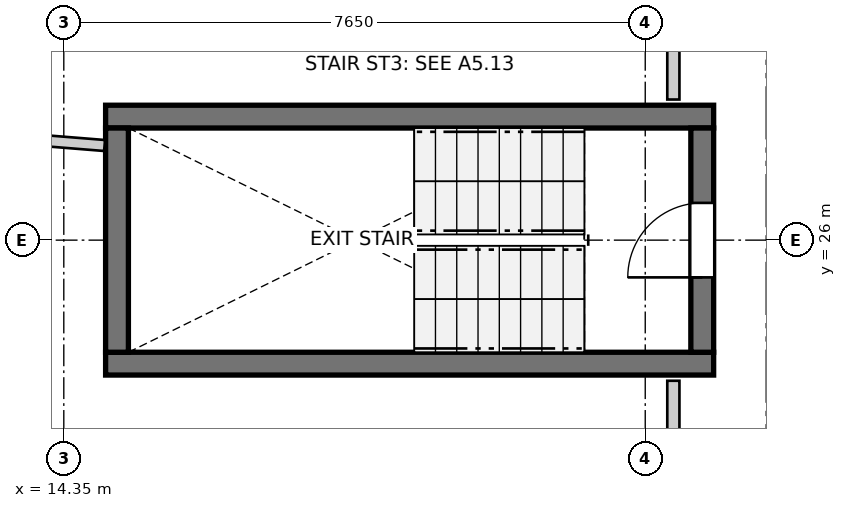
"""IFC4 building model, lengths in metres.
Left out: names, types, materials, properties, quantities, classifications, styles, units other than length and angle.
Written with IfcOpenShell. Run it as: python <this file> out.ifc"""

import sys

from ifc_helpers import new_model, si_unit, direction, frame, frame_2d, origin, place, context, subcontext, project, spatial, rectangle, extrude, source, transform, mapped, element, fill, save


model = new_model("IFC4")
c1 = context("Model", 3, precision=1e-05, world=origin(), true_north=direction((0.0, 1.0)))
c2 = subcontext(c1, "Body", "Model", "MODEL_VIEW")
j1 = project(units=[si_unit("LENGTHUNIT", "METRE"), si_unit("PLANEANGLEUNIT", "RADIAN")], contexts=[c1])
p1 = place(None, origin())
s1 = spatial("IfcSite", under=j1, at=p1, CompositionType="ELEMENT")
p2 = place(p1, origin())
s2 = spatial("IfcBuilding", under=s1, at=p2, CompositionType="ELEMENT")
p3 = place(p2, frame((0.0, 0.0, 165.0)))
s3 = spatial("IfcBuildingStorey", under=s2, at=p3, CompositionType="ELEMENT", Elevation=165.0)
for number, where, z_axis, x_axis in (
    (1, (14.9, 24.375, 0.0), (0.0, 0.0, 1.0), (1.0, 0.0, 0.0)),
    (2, (22.9, 27.625, 0.0), (0.0, 0.0, 1.0), (-1.0, 0.0, 0.0)),
):
    element("IfcWall", number, at=place(p3, frame(where, z_axis=z_axis, x_axis=x_axis)), inside=s3, PredefinedType="SHEAR", context=c2, shape_type="SweptSolid", body=[
        extrude(rectangle(XDim=8.0, YDim=0.3, at=frame_2d((4.0, 0.0))), origin(), (0.0, 0.0, 1.0), 2.95),
    ])
p4 = place(p3, frame((15.05, 27.475, 0.0), z_axis=(0.0, 0.0, 1.0), x_axis=(0.0, -1.0, 0.0)))
e3 = element("IfcWall", 3, at=p4, inside=s3, PredefinedType="SHEAR", context=c2, shape_type="SweptSolid", body=[
    extrude(rectangle(XDim=2.95, YDim=0.3, at=frame_2d((1.475, 0.0))), origin(), (0.0, 0.0, 1.0), 2.95),
])
p5 = place(p3, frame((22.75, 24.525, 0.0), z_axis=(0.0, 0.0, 1.0), x_axis=(0.0, 1.0, 0.0)))
e4 = element("IfcWall", 4, at=p5, inside=s3, PredefinedType="SHEAR", context=c2, shape_type="SweptSolid", body=[
    extrude(rectangle(XDim=2.95, YDim=0.3, at=frame_2d((1.475, 0.0))), origin(), (0.0, 0.0, 1.0), 2.95),
])
p6 = place(p5, frame((0.985, 0.0, 0.0)))
e5 = element("IfcOpeningElement", 5, at=p6, cuts=e4, PredefinedType="OPENING", context=c2, shape_type="SweptSolid", body=[
    extrude(rectangle(XDim=0.98, YDim=2.15, at=frame_2d((0.49, 1.075))), frame((0.0, 0.16, 0.0), z_axis=(0.0, -1.0, 0.0), x_axis=(1.0, 0.0, 0.0)), (0.0, 0.0, 1.0), 0.32),
])
p7 = place(p3, frame((22.37, 14.579, 0.0), z_axis=(0.0, 0.0, 1.0), x_axis=(0.0, 1.0, 0.0)))
e6 = element("IfcWall", 6, at=p7, inside=s3, PredefinedType="PARTITIONING", context=c2, shape_type="SweptSolid", body=[
    extrude(rectangle(XDim=9.571, YDim=0.16, at=frame_2d((4.785, 0.0))), origin(), (0.0, 0.0, 1.0), 2.95),
])
p8 = place(p7, frame((3.793, 0.0, 0.0)))
e7 = element("IfcOpeningElement", 7, at=p8, cuts=e6, PredefinedType="OPENING", context=c2, shape_type="SweptSolid", body=[
    extrude(rectangle(XDim=0.96, YDim=2.1, at=frame_2d((0.48, 1.05))), frame((0.0, 0.09, 0.0), z_axis=(0.0, -1.0, 0.0), x_axis=(1.0, 0.0, 0.0)), (0.0, 0.0, 1.0), 0.18),
])
p9 = place(p3, frame((22.37, 27.85, 0.0), z_axis=(0.0, 0.0, 1.0), x_axis=(0.0, 1.0, 0.0)))
e8 = element("IfcWall", 8, at=p9, inside=s3, PredefinedType="PARTITIONING", context=c2, shape_type="SweptSolid", body=[
    extrude(rectangle(XDim=4.759, YDim=0.16, at=frame_2d((2.379, 0.0))), origin(), (0.0, 0.0, 1.0), 2.95),
])
p10 = place(p9, frame((1.919, 0.0, 0.0)))
e9 = element("IfcOpeningElement", 9, at=p10, cuts=e8, PredefinedType="OPENING", context=c2, shape_type="SweptSolid", body=[
    extrude(rectangle(XDim=0.96, YDim=2.1, at=frame_2d((0.48, 1.05))), frame((0.0, 0.09, 0.0), z_axis=(0.0, -1.0, 0.0), x_axis=(1.0, 0.0, 0.0)), (0.0, 0.0, 1.0), 0.18),
])
p11 = place(p3, frame((8.015, 27.797, 0.0), z_axis=(0.0, 0.0, 1.0), x_axis=(0.996785477909, -0.080116858581, 0.0)))
e10 = element("IfcWall", 10, at=p11, inside=s3, PredefinedType="PARTITIONING", context=c2, shape_type="SweptSolid", body=[
    extrude(rectangle(XDim=6.893, YDim=0.145, at=frame_2d((3.447, 0.0))), origin(), (0.0, 0.0, 1.0), 2.95),
])
m1 = source(origin(), c2, "Body", "SweptSolid", [
    extrude(rectangle(XDim=0.98, YDim=2.15, at=frame_2d((0.49, 1.075))), frame((0.0, 0.025, 0.0), z_axis=(0.0, -1.0, 0.0), x_axis=(1.0, 0.0, 0.0)), (0.0, 0.0, 1.0), 0.05),
])
p12 = place(p6, origin())
e11 = element("IfcDoor", 11, at=p12, inside=s3, OperationType="SINGLE_SWING_LEFT", PredefinedType="DOOR", context=c2, shape_type="MappedRepresentation", body=[
    mapped(m1, transform((0.0, 0.0, 0.0), x_axis=(1.0, 0.0, 0.0), y_axis=(0.0, 1.0, 0.0), z_axis=(0.0, 0.0, 1.0), scale=1.0)),
])
fill(e5, e11)
save(model, sys.argv[1])
